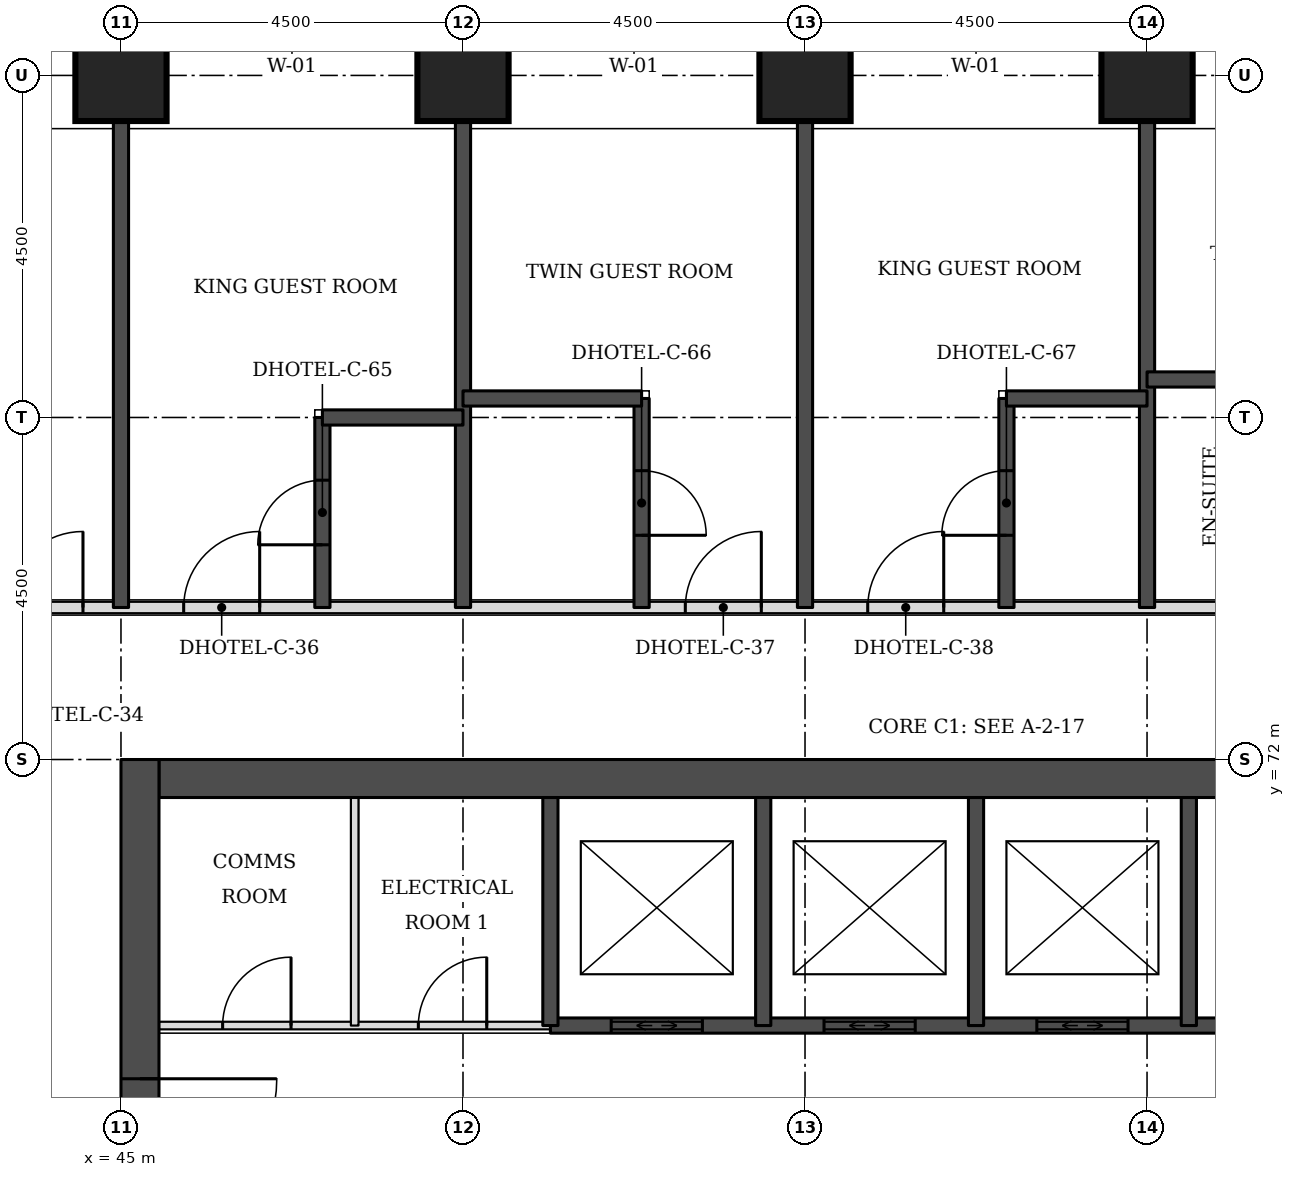
"""IFC4 building model, lengths in metres.
Left out: names, types, materials, properties, quantities, classifications, styles, units other than length and angle.
Written with IfcOpenShell. Run it as: python <this file> out.ifc"""

import sys

from ifc_helpers import new_model, si_unit, direction, frame, frame_2d, origin, origin_2d, place, context, subcontext, project, spatial, rectangle, extrude, element, fill, save


model = new_model("IFC4")
c1 = context("Model", 3, precision=1e-05, world=origin(), true_north=direction((0.0, 1.0)))
c2 = subcontext(c1, "Body", "Model", "MODEL_VIEW")
j1 = project(units=[si_unit("LENGTHUNIT", "METRE"), si_unit("PLANEANGLEUNIT", "RADIAN")], contexts=[c1])
p1 = place(None, origin())
s1 = spatial("IfcSite", under=j1, at=p1, CompositionType="ELEMENT")
p2 = place(p1, origin())
s2 = spatial("IfcBuilding", under=s1, at=p2, CompositionType="ELEMENT")
p3 = place(p2, frame((0.0, 0.0, 56.1)))
s3 = spatial("IfcBuildingStorey", under=s2, at=p3, CompositionType="ELEMENT", Elevation=56.1)
for number, where, z_axis, x_axis in (
    (1, (45.0, 81.0, 0.0), (0.0, 0.0, 1.0), (1.0, 0.0, 0.0)),
    (2, (49.5, 81.0, 0.0), (0.0, 0.0, 1.0), (1.0, 0.0, 0.0)),
    (3, (54.0, 81.0, 0.0), (0.0, 0.0, 1.0), (1.0, 0.0, 0.0)),
    (4, (58.5, 81.0, 0.0), (0.0, 0.0, 1.0), (1.0, 0.0, 0.0)),
):
    element("IfcColumn", number, at=place(p3, frame(where, z_axis=z_axis, x_axis=x_axis)), inside=s3, PredefinedType="COLUMN", context=c2, shape_type="SweptSolid", body=[
        extrude(rectangle(XDim=1.2, YDim=1.2, at=origin_2d()), origin(), (0.0, 0.0, 1.0), 3.3),
    ])
p4 = place(p3, frame((45.5, 71.75, 0.0), z_axis=(0.0, 0.0, 1.0), x_axis=(1.0, 0.0, 0.0)))
e5 = element("IfcWall", 5, at=p4, inside=s3, PredefinedType="SHEAR", context=c2, shape_type="SweptSolid", body=[
    extrude(rectangle(XDim=21.5, YDim=0.5, at=frame_2d((10.75, 0.0))), origin(), (0.0, 0.0, 1.0), 3.3),
])
p5 = place(p3, frame((45.25, 49.5, 0.0), z_axis=(0.0, 0.0, 1.0), x_axis=(0.0, 1.0, 0.0)))
e6 = element("IfcWall", 6, at=p5, inside=s3, PredefinedType="SHEAR", context=c2, shape_type="SweptSolid", body=[
    extrude(rectangle(XDim=22.5, YDim=0.5, at=frame_2d((11.25, 0.0))), origin(), (0.0, 0.0, 1.0), 3.3),
])
p6 = place(p5, frame((4.2, 0.0, 0.0)))
e7 = element("IfcOpeningElement", 7, at=p6, cuts=e6, PredefinedType="OPENING", context=c2, shape_type="SweptSolid", body=[
    extrude(rectangle(XDim=1.8, YDim=2.1, at=frame_2d((0.9, 1.05))), frame((0.0, 0.26, 0.0), z_axis=(0.0, -1.0, 0.0), x_axis=(1.0, 0.0, 0.0)), (0.0, 0.0, 1.0), 0.52),
])
p7 = place(p5, frame((6.9, 0.0, 0.0)))
e8 = element("IfcOpeningElement", 8, at=p7, cuts=e6, PredefinedType="OPENING", context=c2, shape_type="SweptSolid", body=[
    extrude(rectangle(XDim=1.1, YDim=2.1, at=frame_2d((0.55, 1.05))), frame((0.0, 0.26, 0.0), z_axis=(0.0, -1.0, 0.0), x_axis=(1.0, 0.0, 0.0)), (0.0, 0.0, 1.0), 0.52),
])
p8 = place(p5, frame((13.6, 0.0, 0.0)))
e9 = element("IfcOpeningElement", 9, at=p8, cuts=e6, PredefinedType="OPENING", context=c2, shape_type="SweptSolid", body=[
    extrude(rectangle(XDim=1.1, YDim=2.1, at=frame_2d((0.55, 1.05))), frame((0.0, 0.26, 0.0), z_axis=(0.0, -1.0, 0.0), x_axis=(1.0, 0.0, 0.0)), (0.0, 0.0, 1.0), 0.52),
])
p9 = place(p5, frame((16.5, 0.0, 0.0)))
e10 = element("IfcOpeningElement", 10, at=p9, cuts=e6, PredefinedType="OPENING", context=c2, shape_type="SweptSolid", body=[
    extrude(rectangle(XDim=1.8, YDim=2.1, at=frame_2d((0.9, 1.05))), frame((0.0, 0.26, 0.0), z_axis=(0.0, -1.0, 0.0), x_axis=(1.0, 0.0, 0.0)), (0.0, 0.0, 1.0), 0.52),
])
p10 = place(p3, frame((43.0, 74.0, 0.0), z_axis=(0.0, 0.0, 1.0), x_axis=(1.0, 0.0, 0.0)))
e11 = element("IfcWall", 11, at=p10, inside=s3, PredefinedType="PARTITIONING", context=c2, shape_type="SweptSolid", body=[
    extrude(rectangle(XDim=26.5, YDim=0.15, at=frame_2d((13.25, 0.0))), origin(), (0.0, 0.0, 1.0), 3.08),
])
p11 = place(p10, frame((2.825, 0.0, 0.0)))
e12 = element("IfcOpeningElement", 12, at=p11, cuts=e11, PredefinedType="OPENING", context=c2, shape_type="SweptSolid", body=[
    extrude(rectangle(XDim=1.0, YDim=2.1, at=frame_2d((0.5, 1.05))), frame((0.0, 0.085, 0.0), z_axis=(0.0, -1.0, 0.0), x_axis=(1.0, 0.0, 0.0)), (0.0, 0.0, 1.0), 0.17),
])
p12 = place(p10, frame((9.425, 0.0, 0.0)))
e13 = element("IfcOpeningElement", 13, at=p12, cuts=e11, PredefinedType="OPENING", context=c2, shape_type="SweptSolid", body=[
    extrude(rectangle(XDim=1.0, YDim=2.1, at=frame_2d((0.5, 1.05))), frame((0.0, 0.085, 0.0), z_axis=(0.0, -1.0, 0.0), x_axis=(1.0, 0.0, 0.0)), (0.0, 0.0, 1.0), 0.17),
])
p13 = place(p10, frame((11.825, 0.0, 0.0)))
e14 = element("IfcOpeningElement", 14, at=p13, cuts=e11, PredefinedType="OPENING", context=c2, shape_type="SweptSolid", body=[
    extrude(rectangle(XDim=1.0, YDim=2.1, at=frame_2d((0.5, 1.05))), frame((0.0, 0.085, 0.0), z_axis=(0.0, -1.0, 0.0), x_axis=(1.0, 0.0, 0.0)), (0.0, 0.0, 1.0), 0.17),
])
p14 = place(p10, frame((18.425, 0.0, 0.0)))
e15 = element("IfcOpeningElement", 15, at=p14, cuts=e11, PredefinedType="OPENING", context=c2, shape_type="SweptSolid", body=[
    extrude(rectangle(XDim=1.0, YDim=2.1, at=frame_2d((0.5, 1.05))), frame((0.0, 0.085, 0.0), z_axis=(0.0, -1.0, 0.0), x_axis=(1.0, 0.0, 0.0)), (0.0, 0.0, 1.0), 0.17),
])
p15 = place(p10, frame((20.825, 0.0, 0.0)))
e16 = element("IfcOpeningElement", 16, at=p15, cuts=e11, PredefinedType="OPENING", context=c2, shape_type="SweptSolid", body=[
    extrude(rectangle(XDim=1.0, YDim=2.1, at=frame_2d((0.5, 1.05))), frame((0.0, 0.085, 0.0), z_axis=(0.0, -1.0, 0.0), x_axis=(1.0, 0.0, 0.0)), (0.0, 0.0, 1.0), 0.17),
])
p16 = place(p10, frame((0.5, 0.0, 0.0)))
e17 = element("IfcOpeningElement", 17, at=p16, cuts=e11, PredefinedType="OPENING", context=c2, shape_type="SweptSolid", body=[
    extrude(rectangle(XDim=1.0, YDim=2.1, at=frame_2d((0.5, 1.05))), frame((0.0, 0.085, 0.0), z_axis=(0.0, -1.0, 0.0), x_axis=(1.0, 0.0, 0.0)), (0.0, 0.0, 1.0), 0.17),
])
p17 = place(p10, frame((25.0, 0.0, 0.0)))
e18 = element("IfcOpeningElement", 18, at=p17, cuts=e11, PredefinedType="OPENING", context=c2, shape_type="SweptSolid", body=[
    extrude(rectangle(XDim=1.0, YDim=2.1, at=frame_2d((0.5, 1.05))), frame((0.0, 0.085, 0.0), z_axis=(0.0, -1.0, 0.0), x_axis=(1.0, 0.0, 0.0)), (0.0, 0.0, 1.0), 0.17),
])
p18 = place(p3, frame((45.0, 74.0, 0.0), z_axis=(0.0, 0.0, 1.0), x_axis=(0.0, 1.0, 0.0)))
e19 = element("IfcWall", 19, at=p18, inside=s3, PredefinedType="SOLIDWALL", context=c2, shape_type="SweptSolid", body=[
    extrude(rectangle(XDim=6.4, YDim=0.2, at=frame_2d((3.2, 0.0))), origin(), (0.0, 0.0, 1.0), 3.08),
])
p19 = place(p3, frame((47.65, 74.0, 0.0), z_axis=(0.0, 0.0, 1.0), x_axis=(0.0, 1.0, 0.0)))
e20 = element("IfcWall", 20, at=p19, inside=s3, PredefinedType="SOLIDWALL", context=c2, shape_type="SweptSolid", body=[
    extrude(rectangle(XDim=2.5, YDim=0.2, at=frame_2d((1.25, 0.0))), origin(), (0.0, 0.0, 1.0), 3.08),
])
p20 = place(p19, frame((0.825, 0.0, 0.0)))
e21 = element("IfcOpeningElement", 21, at=p20, cuts=e20, PredefinedType="OPENING", context=c2, shape_type="SweptSolid", body=[
    extrude(rectangle(XDim=0.85, YDim=2.1, at=frame_2d((0.425, 1.05))), frame((0.0, 0.11, 0.0), z_axis=(0.0, -1.0, 0.0), x_axis=(1.0, 0.0, 0.0)), (0.0, 0.0, 1.0), 0.22),
])
p21 = place(p3, frame((49.5, 74.0, 0.0), z_axis=(0.0, 0.0, 1.0), x_axis=(0.0, 1.0, 0.0)))
e22 = element("IfcWall", 22, at=p21, inside=s3, PredefinedType="SOLIDWALL", context=c2, shape_type="SweptSolid", body=[
    extrude(rectangle(XDim=6.4, YDim=0.2, at=frame_2d((3.2, 0.0))), origin(), (0.0, 0.0, 1.0), 3.08),
])
p22 = place(p3, frame((51.85, 74.0, 0.0), z_axis=(0.0, 0.0, 1.0), x_axis=(0.0, 1.0, 0.0)))
e23 = element("IfcWall", 23, at=p22, inside=s3, PredefinedType="SOLIDWALL", context=c2, shape_type="SweptSolid", body=[
    extrude(rectangle(XDim=2.75, YDim=0.2, at=frame_2d((1.375, 0.0))), origin(), (0.0, 0.0, 1.0), 3.08),
])
p23 = place(p22, frame((0.95, 0.0, 0.0)))
e24 = element("IfcOpeningElement", 24, at=p23, cuts=e23, PredefinedType="OPENING", context=c2, shape_type="SweptSolid", body=[
    extrude(rectangle(XDim=0.85, YDim=2.1, at=frame_2d((0.425, 1.05))), frame((0.0, 0.11, 0.0), z_axis=(0.0, -1.0, 0.0), x_axis=(1.0, 0.0, 0.0)), (0.0, 0.0, 1.0), 0.22),
])
p24 = place(p3, frame((54.0, 74.0, 0.0), z_axis=(0.0, 0.0, 1.0), x_axis=(0.0, 1.0, 0.0)))
e25 = element("IfcWall", 25, at=p24, inside=s3, PredefinedType="SOLIDWALL", context=c2, shape_type="SweptSolid", body=[
    extrude(rectangle(XDim=6.4, YDim=0.2, at=frame_2d((3.2, 0.0))), origin(), (0.0, 0.0, 1.0), 3.08),
])
p25 = place(p3, frame((56.65, 74.0, 0.0), z_axis=(0.0, 0.0, 1.0), x_axis=(0.0, 1.0, 0.0)))
e26 = element("IfcWall", 26, at=p25, inside=s3, PredefinedType="SOLIDWALL", context=c2, shape_type="SweptSolid", body=[
    extrude(rectangle(XDim=2.75, YDim=0.2, at=frame_2d((1.375, 0.0))), origin(), (0.0, 0.0, 1.0), 3.08),
])
p26 = place(p25, frame((0.95, 0.0, 0.0)))
e27 = element("IfcOpeningElement", 27, at=p26, cuts=e26, PredefinedType="OPENING", context=c2, shape_type="SweptSolid", body=[
    extrude(rectangle(XDim=0.85, YDim=2.1, at=frame_2d((0.425, 1.05))), frame((0.0, 0.11, 0.0), z_axis=(0.0, -1.0, 0.0), x_axis=(1.0, 0.0, 0.0)), (0.0, 0.0, 1.0), 0.22),
])
p27 = place(p3, frame((58.5, 74.0, 0.0), z_axis=(0.0, 0.0, 1.0), x_axis=(0.0, 1.0, 0.0)))
e28 = element("IfcWall", 28, at=p27, inside=s3, PredefinedType="SOLIDWALL", context=c2, shape_type="SweptSolid", body=[
    extrude(rectangle(XDim=6.4, YDim=0.2, at=frame_2d((3.2, 0.0))), origin(), (0.0, 0.0, 1.0), 3.08),
])
p28 = place(p3, frame((47.65, 76.5, 0.0), z_axis=(0.0, 0.0, 1.0), x_axis=(1.0, 0.0, 0.0)))
e29 = element("IfcWall", 29, at=p28, inside=s3, PredefinedType="SOLIDWALL", context=c2, shape_type="SweptSolid", body=[
    extrude(rectangle(XDim=1.85, YDim=0.2, at=frame_2d((0.925, 0.0))), origin(), (0.0, 0.0, 1.0), 3.08),
])
p29 = place(p3, frame((49.5, 76.75, 0.0), z_axis=(0.0, 0.0, 1.0), x_axis=(1.0, 0.0, 0.0)))
e30 = element("IfcWall", 30, at=p29, inside=s3, PredefinedType="SOLIDWALL", context=c2, shape_type="SweptSolid", body=[
    extrude(rectangle(XDim=2.35, YDim=0.2, at=frame_2d((1.175, 0.0))), origin(), (0.0, 0.0, 1.0), 3.08),
])
p30 = place(p3, frame((56.65, 76.75, 0.0), z_axis=(0.0, 0.0, 1.0), x_axis=(1.0, 0.0, 0.0)))
e31 = element("IfcWall", 31, at=p30, inside=s3, PredefinedType="SOLIDWALL", context=c2, shape_type="SweptSolid", body=[
    extrude(rectangle(XDim=1.85, YDim=0.2, at=frame_2d((0.925, 0.0))), origin(), (0.0, 0.0, 1.0), 3.08),
])
p31 = place(p3, frame((58.5, 77.0, 0.0), z_axis=(0.0, 0.0, 1.0), x_axis=(1.0, 0.0, 0.0)))
e32 = element("IfcWall", 32, at=p31, inside=s3, PredefinedType="SOLIDWALL", context=c2, shape_type="SweptSolid", body=[
    extrude(rectangle(XDim=2.35, YDim=0.2, at=frame_2d((1.175, 0.0))), origin(), (0.0, 0.0, 1.0), 3.08),
])
p32 = place(p3, frame((45.5, 68.5, 0.0), z_axis=(0.0, 0.0, 1.0), x_axis=(1.0, 0.0, 0.0)))
e33 = element("IfcWall", 33, at=p32, inside=s3, PredefinedType="PARTITIONING", context=c2, shape_type="SweptSolid", body=[
    extrude(rectangle(XDim=5.15, YDim=0.1, at=frame_2d((2.575, 0.0))), origin(), (0.0, 0.0, 1.0), 3.08),
])
p33 = place(p32, frame((0.837, 0.0, 0.0)))
e34 = element("IfcOpeningElement", 34, at=p33, cuts=e33, PredefinedType="OPENING", context=c2, shape_type="SweptSolid", body=[
    extrude(rectangle(XDim=0.9, YDim=2.1, at=frame_2d((0.45, 1.05))), frame((0.0, 0.06, 0.0), z_axis=(0.0, -1.0, 0.0), x_axis=(1.0, 0.0, 0.0)), (0.0, 0.0, 1.0), 0.12),
])
p34 = place(p32, frame((3.413, 0.0, 0.0)))
e35 = element("IfcOpeningElement", 35, at=p34, cuts=e33, PredefinedType="OPENING", context=c2, shape_type="SweptSolid", body=[
    extrude(rectangle(XDim=0.9, YDim=2.1, at=frame_2d((0.45, 1.05))), frame((0.0, 0.06, 0.0), z_axis=(0.0, -1.0, 0.0), x_axis=(1.0, 0.0, 0.0)), (0.0, 0.0, 1.0), 0.12),
])
p35 = place(p3, frame((50.65, 68.5, 0.0), z_axis=(0.0, 0.0, 1.0), x_axis=(1.0, 0.0, 0.0)))
e36 = element("IfcWall", 36, at=p35, inside=s3, PredefinedType="SOLIDWALL", context=c2, shape_type="SweptSolid", body=[
    extrude(rectangle(XDim=11.2, YDim=0.2, at=frame_2d((5.6, 0.0))), origin(), (0.0, 0.0, 1.0), 3.08),
])
p36 = place(p35, frame((0.8, 0.0, 0.0)))
e37 = element("IfcOpeningElement", 37, at=p36, cuts=e36, PredefinedType="OPENING", context=c2, shape_type="SweptSolid", body=[
    extrude(rectangle(XDim=1.2, YDim=2.1, at=frame_2d((0.6, 1.05))), frame((0.0, 0.11, 0.0), z_axis=(0.0, -1.0, 0.0), x_axis=(1.0, 0.0, 0.0)), (0.0, 0.0, 1.0), 0.22),
])
p37 = place(p35, frame((3.6, 0.0, 0.0)))
e38 = element("IfcOpeningElement", 38, at=p37, cuts=e36, PredefinedType="OPENING", context=c2, shape_type="SweptSolid", body=[
    extrude(rectangle(XDim=1.2, YDim=2.1, at=frame_2d((0.6, 1.05))), frame((0.0, 0.11, 0.0), z_axis=(0.0, -1.0, 0.0), x_axis=(1.0, 0.0, 0.0)), (0.0, 0.0, 1.0), 0.22),
])
p38 = place(p35, frame((6.4, 0.0, 0.0)))
e39 = element("IfcOpeningElement", 39, at=p38, cuts=e36, PredefinedType="OPENING", context=c2, shape_type="SweptSolid", body=[
    extrude(rectangle(XDim=1.2, YDim=2.1, at=frame_2d((0.6, 1.05))), frame((0.0, 0.11, 0.0), z_axis=(0.0, -1.0, 0.0), x_axis=(1.0, 0.0, 0.0)), (0.0, 0.0, 1.0), 0.22),
])
p39 = place(p35, frame((9.2, 0.0, 0.0)))
e40 = element("IfcOpeningElement", 40, at=p39, cuts=e36, PredefinedType="OPENING", context=c2, shape_type="SweptSolid", body=[
    extrude(rectangle(XDim=1.2, YDim=2.1, at=frame_2d((0.6, 1.05))), frame((0.0, 0.11, 0.0), z_axis=(0.0, -1.0, 0.0), x_axis=(1.0, 0.0, 0.0)), (0.0, 0.0, 1.0), 0.22),
])
p40 = place(p3, frame((48.075, 68.5, 0.0), z_axis=(0.0, 0.0, 1.0), x_axis=(0.0, 1.0, 0.0)))
e41 = element("IfcWall", 41, at=p40, inside=s3, PredefinedType="PARTITIONING", context=c2, shape_type="SweptSolid", body=[
    extrude(rectangle(XDim=3.0, YDim=0.1, at=frame_2d((1.5, 0.0))), origin(), (0.0, 0.0, 1.0), 3.08),
])
for number, where, z_axis, x_axis in (
    (42, (50.65, 68.5, 0.0), (0.0, 0.0, 1.0), (0.0, 1.0, 0.0)),
    (43, (53.45, 68.5, 0.0), (0.0, 0.0, 1.0), (0.0, 1.0, 0.0)),
    (44, (56.25, 68.5, 0.0), (0.0, 0.0, 1.0), (0.0, 1.0, 0.0)),
    (45, (59.05, 68.5, 0.0), (0.0, 0.0, 1.0), (0.0, 1.0, 0.0)),
):
    element("IfcWall", number, at=place(p3, frame(where, z_axis=z_axis, x_axis=x_axis)), inside=s3, PredefinedType="SOLIDWALL", context=c2, shape_type="SweptSolid", body=[
        extrude(rectangle(XDim=3.0, YDim=0.2, at=frame_2d((1.5, 0.0))), origin(), (0.0, 0.0, 1.0), 3.08),
    ])
p41 = place(p11, origin())
e46 = element("IfcDoor", 46, at=p41, inside=s3, OperationType="SINGLE_SWING_RIGHT", PredefinedType="DOOR", context=c2, shape_type="SweptSolid", body=[
    extrude(rectangle(XDim=1.0, YDim=2.1, at=frame_2d((0.5, 1.05))), frame((0.0, 0.025, 0.0), z_axis=(0.0, -1.0, 0.0), x_axis=(1.0, 0.0, 0.0)), (0.0, 0.0, 1.0), 0.05),
])
fill(e12, e46)
p42 = place(p20, origin())
e47 = element("IfcDoor", 47, at=p42, inside=s3, OperationType="SINGLE_SWING_LEFT", PredefinedType="DOOR", context=c2, shape_type="SweptSolid", body=[
    extrude(rectangle(XDim=0.85, YDim=2.1, at=frame_2d((0.425, 1.05))), frame((0.0, 0.025, 0.0), z_axis=(0.0, -1.0, 0.0), x_axis=(1.0, 0.0, 0.0)), (0.0, 0.0, 1.0), 0.05),
])
fill(e21, e47)
p43 = place(p12, origin())
e48 = element("IfcDoor", 48, at=p43, inside=s3, OperationType="SINGLE_SWING_RIGHT", PredefinedType="DOOR", context=c2, shape_type="SweptSolid", body=[
    extrude(rectangle(XDim=1.0, YDim=2.1, at=frame_2d((0.5, 1.05))), frame((0.0, 0.025, 0.0), z_axis=(0.0, -1.0, 0.0), x_axis=(1.0, 0.0, 0.0)), (0.0, 0.0, 1.0), 0.05),
])
fill(e13, e48)
p44 = place(p23, frame((0.85, 0.0, 0.0), z_axis=(0.0, 0.0, 1.0), x_axis=(-1.0, 0.0, 0.0)))
e49 = element("IfcDoor", 49, at=p44, inside=s3, OperationType="SINGLE_SWING_RIGHT", PredefinedType="DOOR", context=c2, shape_type="SweptSolid", body=[
    extrude(rectangle(XDim=0.85, YDim=2.1, at=frame_2d((0.425, 1.05))), frame((0.0, 0.025, 0.0), z_axis=(0.0, -1.0, 0.0), x_axis=(1.0, 0.0, 0.0)), (0.0, 0.0, 1.0), 0.05),
])
fill(e24, e49)
p45 = place(p13, origin())
e50 = element("IfcDoor", 50, at=p45, inside=s3, OperationType="SINGLE_SWING_RIGHT", PredefinedType="DOOR", context=c2, shape_type="SweptSolid", body=[
    extrude(rectangle(XDim=1.0, YDim=2.1, at=frame_2d((0.5, 1.05))), frame((0.0, 0.025, 0.0), z_axis=(0.0, -1.0, 0.0), x_axis=(1.0, 0.0, 0.0)), (0.0, 0.0, 1.0), 0.05),
])
fill(e14, e50)
p46 = place(p26, origin())
e51 = element("IfcDoor", 51, at=p46, inside=s3, OperationType="SINGLE_SWING_LEFT", PredefinedType="DOOR", context=c2, shape_type="SweptSolid", body=[
    extrude(rectangle(XDim=0.85, YDim=2.1, at=frame_2d((0.425, 1.05))), frame((0.0, 0.025, 0.0), z_axis=(0.0, -1.0, 0.0), x_axis=(1.0, 0.0, 0.0)), (0.0, 0.0, 1.0), 0.05),
])
fill(e27, e51)
p47 = place(p16, origin())
e52 = element("IfcDoor", 52, at=p47, inside=s3, OperationType="SINGLE_SWING_RIGHT", PredefinedType="DOOR", context=c2, shape_type="SweptSolid", body=[
    extrude(rectangle(XDim=1.0, YDim=2.1, at=frame_2d((0.5, 1.05))), frame((0.0, 0.025, 0.0), z_axis=(0.0, -1.0, 0.0), x_axis=(1.0, 0.0, 0.0)), (0.0, 0.0, 1.0), 0.05),
])
fill(e17, e52)
p48 = place(p36, origin())
e53 = element("IfcDoor", 53, at=p48, inside=s3, OperationType="DOUBLE_DOOR_SLIDING", PredefinedType="DOOR", context=c2, shape_type="SweptSolid", body=[
    extrude(rectangle(XDim=1.2, YDim=2.1, at=frame_2d((0.6, 1.05))), frame((0.0, 0.025, 0.0), z_axis=(0.0, -1.0, 0.0), x_axis=(1.0, 0.0, 0.0)), (0.0, 0.0, 1.0), 0.05),
])
fill(e37, e53)
p49 = place(p37, origin())
e54 = element("IfcDoor", 54, at=p49, inside=s3, OperationType="DOUBLE_DOOR_SLIDING", PredefinedType="DOOR", context=c2, shape_type="SweptSolid", body=[
    extrude(rectangle(XDim=1.2, YDim=2.1, at=frame_2d((0.6, 1.05))), frame((0.0, 0.025, 0.0), z_axis=(0.0, -1.0, 0.0), x_axis=(1.0, 0.0, 0.0)), (0.0, 0.0, 1.0), 0.05),
])
fill(e38, e54)
p50 = place(p38, origin())
e55 = element("IfcDoor", 55, at=p50, inside=s3, OperationType="DOUBLE_DOOR_SLIDING", PredefinedType="DOOR", context=c2, shape_type="SweptSolid", body=[
    extrude(rectangle(XDim=1.2, YDim=2.1, at=frame_2d((0.6, 1.05))), frame((0.0, 0.025, 0.0), z_axis=(0.0, -1.0, 0.0), x_axis=(1.0, 0.0, 0.0)), (0.0, 0.0, 1.0), 0.05),
])
fill(e39, e55)
p51 = place(p9, frame((1.8, 0.0, 0.0), z_axis=(0.0, 0.0, 1.0), x_axis=(-1.0, 0.0, 0.0)))
e56 = element("IfcDoor", 56, at=p51, inside=s3, OperationType="SINGLE_SWING_LEFT", PredefinedType="DOOR", context=c2, shape_type="SweptSolid", body=[
    extrude(rectangle(XDim=1.8, YDim=2.1, at=frame_2d((0.9, 1.05))), frame((0.0, 0.025, 0.0), z_axis=(0.0, -1.0, 0.0), x_axis=(1.0, 0.0, 0.0)), (0.0, 0.0, 1.0), 0.05),
])
fill(e10, e56)
p52 = place(p33, origin())
e57 = element("IfcDoor", 57, at=p52, inside=s3, OperationType="SINGLE_SWING_RIGHT", PredefinedType="DOOR", context=c2, shape_type="SweptSolid", body=[
    extrude(rectangle(XDim=0.9, YDim=2.1, at=frame_2d((0.45, 1.05))), frame((0.0, 0.025, 0.0), z_axis=(0.0, -1.0, 0.0), x_axis=(1.0, 0.0, 0.0)), (0.0, 0.0, 1.0), 0.05),
])
fill(e34, e57)
p53 = place(p34, origin())
e58 = element("IfcDoor", 58, at=p53, inside=s3, OperationType="SINGLE_SWING_RIGHT", PredefinedType="DOOR", context=c2, shape_type="SweptSolid", body=[
    extrude(rectangle(XDim=0.9, YDim=2.1, at=frame_2d((0.45, 1.05))), frame((0.0, 0.025, 0.0), z_axis=(0.0, -1.0, 0.0), x_axis=(1.0, 0.0, 0.0)), (0.0, 0.0, 1.0), 0.05),
])
fill(e35, e58)
save(model, sys.argv[1])
